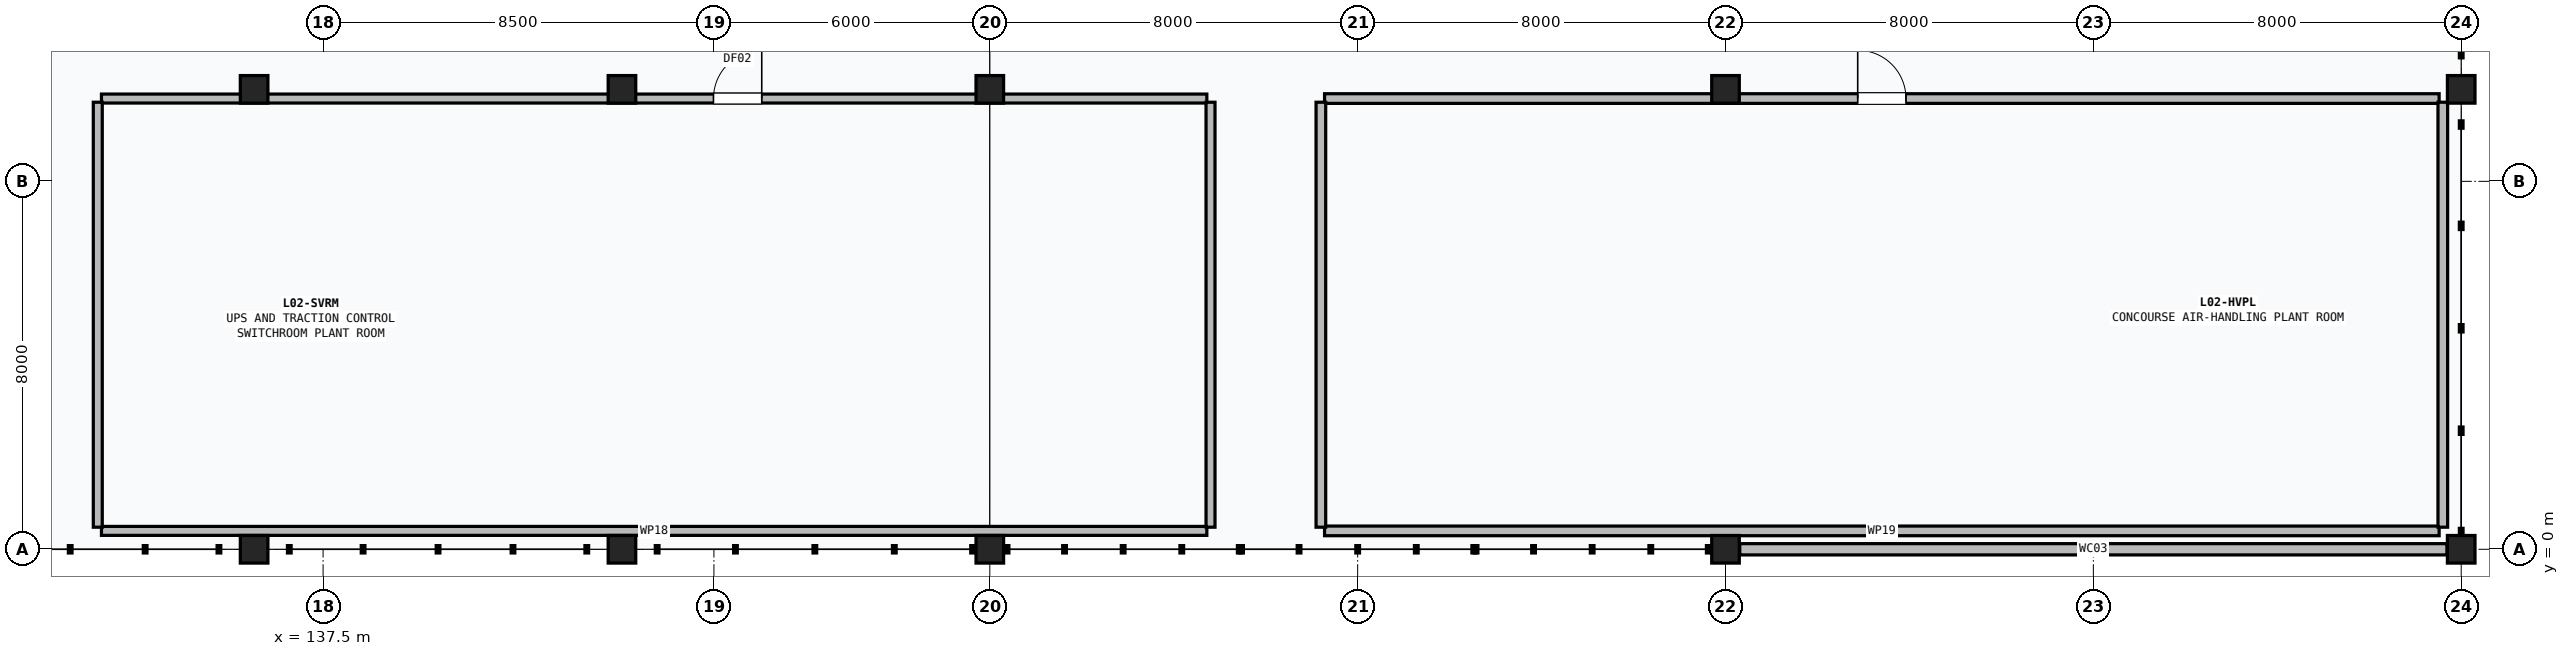
"""IFC4 building model, lengths in metres.
Left out: names, types, materials, properties, quantities, classifications, styles, units other than length and angle.
Written with IfcOpenShell. Run it as: python <this file> out.ifc"""

import sys

from ifc_helpers import new_model, si_unit, direction, frame, frame_2d, origin, origin_2d, place, context, subcontext, project, spatial, rectangle, extrude, element, fill, save


model = new_model("IFC4")
c1 = context("Model", 3, precision=1e-05, world=origin(), true_north=direction((0.0, 1.0)))
c2 = subcontext(c1, "Body", "Model", "MODEL_VIEW")
j1 = project(units=[si_unit("LENGTHUNIT", "METRE"), si_unit("PLANEANGLEUNIT", "RADIAN")], contexts=[c1])
p1 = place(None, origin())
s1 = spatial("IfcSite", under=j1, at=p1, CompositionType="ELEMENT")
p2 = place(p1, origin())
s2 = spatial("IfcBuilding", under=s1, at=p2, CompositionType="ELEMENT")
p3 = place(p2, frame((0.0, 0.0, 8.4)))
s3 = spatial("IfcBuildingStorey", under=s2, at=p3, CompositionType="ELEMENT", Elevation=8.4)
for number, where, z_axis, x_axis in (
    (1, (136.0, 0.0, 0.0), (0.0, 0.0, 1.0), (1.0, 0.0, 0.0)),
    (2, (136.0, 10.0, 0.0), (0.0, 0.0, 1.0), (1.0, 0.0, 0.0)),
    (3, (144.0, 0.0, 0.0), (0.0, 0.0, 1.0), (1.0, 0.0, 0.0)),
    (4, (144.0, 10.0, 0.0), (0.0, 0.0, 1.0), (1.0, 0.0, 0.0)),
    (5, (152.0, 0.0, 0.0), (0.0, 0.0, 1.0), (1.0, 0.0, 0.0)),
    (6, (152.0, 10.0, 0.0), (0.0, 0.0, 1.0), (1.0, 0.0, 0.0)),
    (7, (168.0, 0.0, 0.0), (0.0, 0.0, 1.0), (1.0, 0.0, 0.0)),
    (8, (168.0, 10.0, 0.0), (0.0, 0.0, 1.0), (1.0, 0.0, 0.0)),
    (9, (184.0, 0.0, 0.0), (0.0, 0.0, 1.0), (1.0, 0.0, 0.0)),
    (10, (184.0, 10.0, 0.0), (0.0, 0.0, 1.0), (1.0, 0.0, 0.0)),
):
    element("IfcColumn", number, at=place(p3, frame(where, z_axis=z_axis, x_axis=x_axis)), inside=s3, PredefinedType="COLUMN", context=c2, shape_type="SweptSolid", body=[
        extrude(rectangle(XDim=0.6, YDim=0.6, at=origin_2d()), origin(), (0.0, 0.0, 1.0), 3.6),
    ])
p4 = place(p3, frame((168.31, 0.0, 0.0), z_axis=(0.0, 0.0, 1.0), x_axis=(1.0, 0.0, 0.0)))
e11 = element("IfcWall", 11, at=p4, inside=s3, PredefinedType="USERDEFINED", context=c2, shape_type="SweptSolid", body=[
    extrude(rectangle(XDim=15.38, YDim=0.245, at=frame_2d((7.69, 0.0))), origin(), (0.0, 0.0, 1.0), 2.295),
])
p5 = place(p3, frame((132.68, 0.4, 0.0), z_axis=(0.0, 0.0, 1.0), x_axis=(1.0, 0.0, 0.0)))
e12 = element("IfcWall", 12, at=p5, inside=s3, PredefinedType="PARTITIONING", context=c2, shape_type="SweptSolid", body=[
    extrude(rectangle(XDim=24.04, YDim=0.195, at=frame_2d((12.02, 0.0))), origin(), (0.0, 0.0, 1.0), 2.695),
])
p6 = place(p3, frame((132.68, 9.8, 0.0), z_axis=(0.0, 0.0, 1.0), x_axis=(1.0, 0.0, 0.0)))
e13 = element("IfcWall", 13, at=p6, inside=s3, PredefinedType="PARTITIONING", context=c2, shape_type="SweptSolid", body=[
    extrude(rectangle(XDim=24.04, YDim=0.195, at=frame_2d((12.02, 0.0))), origin(), (0.0, 0.0, 1.0), 2.345),
])
p7 = place(p6, frame((13.31, 0.0, 0.0)))
e14 = element("IfcOpeningElement", 14, at=p7, cuts=e13, PredefinedType="OPENING", context=c2, shape_type="SweptSolid", body=[
    extrude(rectangle(XDim=1.05, YDim=2.15, at=frame_2d((0.525, 1.075))), frame((0.0, 0.107, 0.0), z_axis=(0.0, -1.0, 0.0), x_axis=(1.0, 0.0, 0.0)), (0.0, 0.0, 1.0), 0.215),
])
p8 = place(p3, frame((132.6, 0.48, 0.0), z_axis=(0.0, 0.0, 1.0), x_axis=(0.0, 1.0, 0.0)))
e15 = element("IfcWall", 15, at=p8, inside=s3, PredefinedType="PARTITIONING", context=c2, shape_type="SweptSolid", body=[
    extrude(rectangle(XDim=9.24, YDim=0.195, at=frame_2d((4.62, 0.0))), origin(), (0.0, 0.0, 1.0), 3.345),
])
p9 = place(p3, frame((156.8, 0.48, 0.0), z_axis=(0.0, 0.0, 1.0), x_axis=(0.0, 1.0, 0.0)))
e16 = element("IfcWall", 16, at=p9, inside=s3, PredefinedType="PARTITIONING", context=c2, shape_type="SweptSolid", body=[
    extrude(rectangle(XDim=9.24, YDim=0.195, at=frame_2d((4.62, 0.0))), origin(), (0.0, 0.0, 1.0), 2.395),
])
p10 = place(p3, frame((159.28, 0.4, 0.0), z_axis=(0.0, 0.0, 1.0), x_axis=(1.0, 0.0, 0.0)))
e17 = element("IfcWall", 17, at=p10, inside=s3, PredefinedType="PARTITIONING", context=c2, shape_type="SweptSolid", body=[
    extrude(rectangle(XDim=24.24, YDim=0.21, at=frame_2d((12.12, 0.0))), origin(), (0.0, 0.0, 1.0), 2.695),
])
p11 = place(p3, frame((159.28, 9.8, 0.0), z_axis=(0.0, 0.0, 1.0), x_axis=(1.0, 0.0, 0.0)))
e18 = element("IfcWall", 18, at=p11, inside=s3, PredefinedType="PARTITIONING", context=c2, shape_type="SweptSolid", body=[
    extrude(rectangle(XDim=24.24, YDim=0.21, at=frame_2d((12.12, 0.0))), origin(), (0.0, 0.0, 1.0), 2.395),
])
p12 = place(p11, frame((11.595, 0.0, 0.0)))
e19 = element("IfcOpeningElement", 19, at=p12, cuts=e18, PredefinedType="OPENING", context=c2, shape_type="SweptSolid", body=[
    extrude(rectangle(XDim=1.05, YDim=2.15, at=frame_2d((0.525, 1.075))), frame((0.0, 0.115, 0.0), z_axis=(0.0, -1.0, 0.0), x_axis=(1.0, 0.0, 0.0)), (0.0, 0.0, 1.0), 0.23),
])
for number, where, z_axis, x_axis in (
    (20, (159.2, 0.48, 0.0), (0.0, 0.0, 1.0), (0.0, 1.0, 0.0)),
    (21, (183.6, 0.48, 0.0), (0.0, 0.0, 1.0), (0.0, 1.0, 0.0)),
):
    element("IfcWall", number, at=place(p3, frame(where, z_axis=z_axis, x_axis=x_axis)), inside=s3, PredefinedType="PARTITIONING", context=c2, shape_type="SweptSolid", body=[
        extrude(rectangle(XDim=9.24, YDim=0.21, at=frame_2d((4.62, 0.0))), origin(), (0.0, 0.0, 1.0), 2.395),
    ])
p13 = place(p7, origin())
e22 = element("IfcDoor", 22, at=p13, inside=s3, OperationType="SINGLE_SWING_RIGHT", PredefinedType="DOOR", context=c2, shape_type="SweptSolid", body=[
    extrude(rectangle(XDim=1.05, YDim=2.15, at=frame_2d((0.525, 1.075))), frame((0.0, 0.025, 0.0), z_axis=(0.0, -1.0, 0.0), x_axis=(1.0, 0.0, 0.0)), (0.0, 0.0, 1.0), 0.05),
])
fill(e14, e22)
p14 = place(p12, origin())
e23 = element("IfcDoor", 23, at=p14, inside=s3, OperationType="SINGLE_SWING_LEFT", PredefinedType="DOOR", context=c2, shape_type="SweptSolid", body=[
    extrude(rectangle(XDim=1.05, YDim=2.15, at=frame_2d((0.525, 1.075))), frame((0.0, 0.025, 0.0), z_axis=(0.0, -1.0, 0.0), x_axis=(1.0, 0.0, 0.0)), (0.0, 0.0, 1.0), 0.05),
])
fill(e19, e23)
save(model, sys.argv[1])
